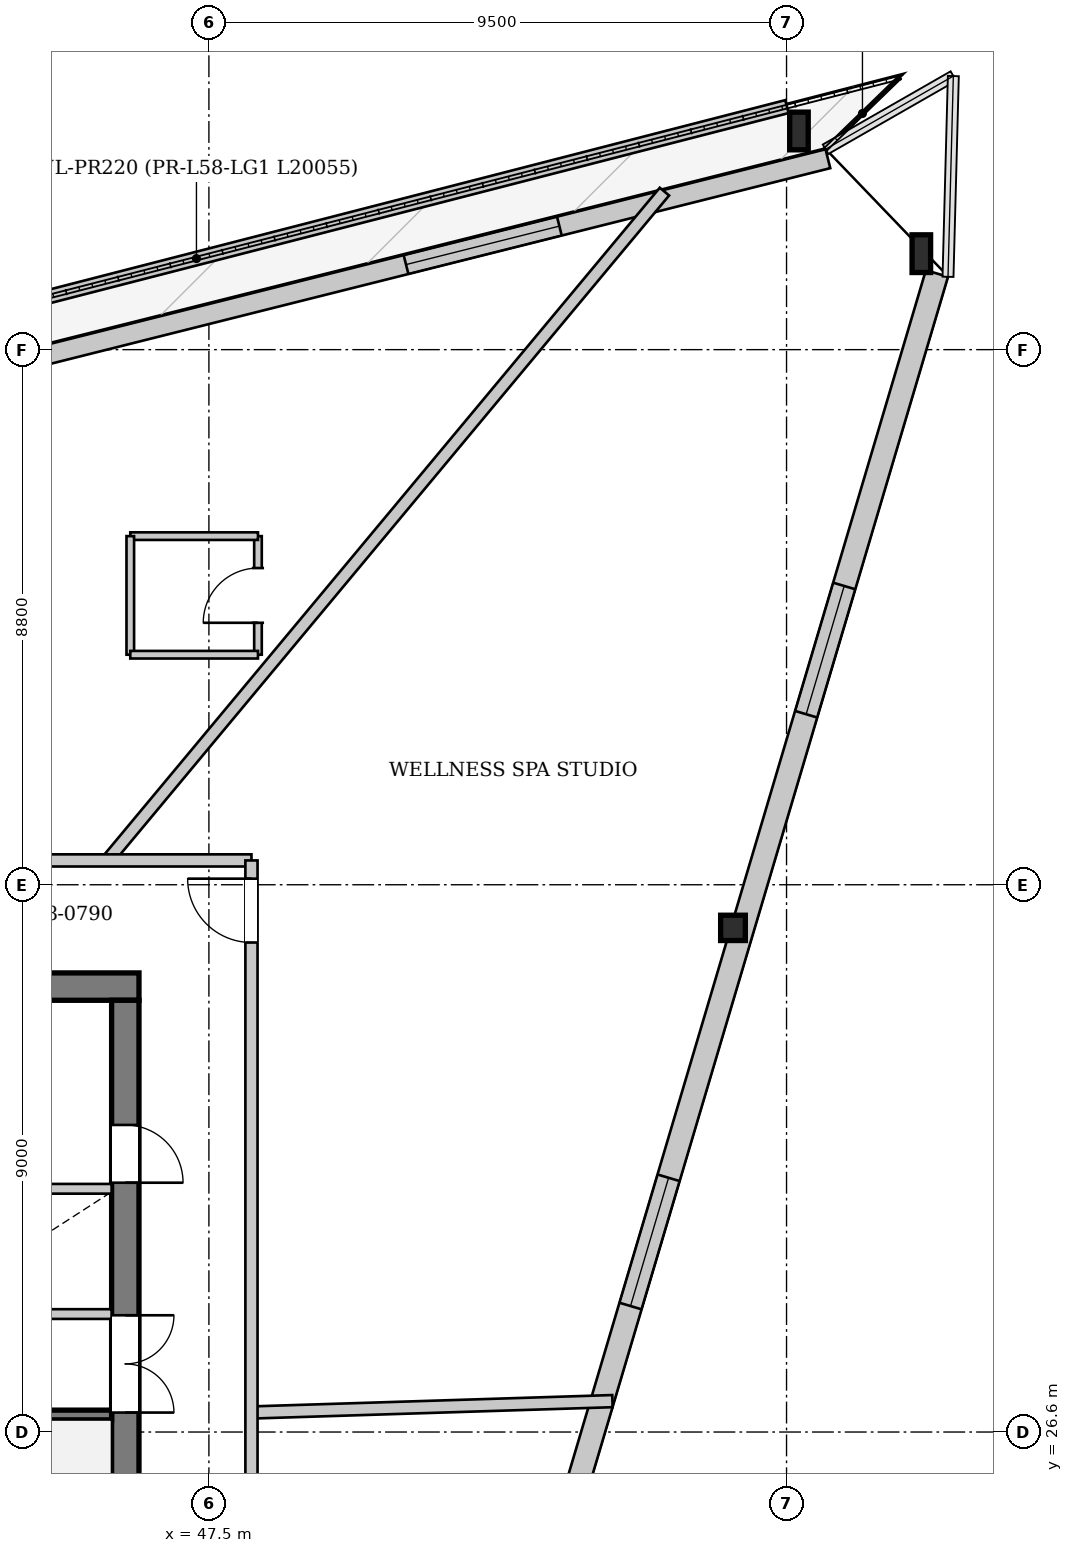
"""IFC4 building model, lengths in metres.
Left out: names, types, materials, properties, quantities, classifications, styles, units other than length and angle.
Written with IfcOpenShell. Run it as: python <this file> out.ifc"""

import sys

from ifc_helpers import new_model, si_unit, direction, frame, frame_2d, origin, origin_2d, place, context, subcontext, project, spatial, rectangle, i_section, extrude, source, transform, mapped, element, fill, save


model = new_model("IFC4")
c1 = context("Model", 3, precision=1e-05, world=origin(), true_north=direction((0.0, 1.0)))
c2 = subcontext(c1, "Body", "Model", "MODEL_VIEW")
j1 = project(units=[si_unit("LENGTHUNIT", "METRE"), si_unit("PLANEANGLEUNIT", "RADIAN")], contexts=[c1])
p1 = place(None, origin())
s1 = spatial("IfcSite", under=j1, at=p1, CompositionType="ELEMENT")
p2 = place(p1, origin())
s2 = spatial("IfcBuilding", under=s1, at=p2, CompositionType="ELEMENT")
p3 = place(p2, frame((0.0, 0.0, 220.25)))
s3 = spatial("IfcBuildingStorey", under=s2, at=p3, CompositionType="ELEMENT", Elevation=220.25)
m1 = source(origin(), c2, "Body", "SweptSolid", [
    extrude(i_section(OverallWidth=0.305, OverallDepth=0.62, WebThickness=0.021, FlangeThickness=0.04, at=origin_2d()), origin(), (0.0, 0.0, 1.0), 3.579),
])
p4 = place(p3, frame((59.656, 45.598, 0.0), z_axis=(-0.245246591305, 0.2126380042, 0.94585368246), x_axis=(-0.65509054937, -0.755550376961, 0.0)))
e1 = element("IfcColumn", 1, at=p4, inside=s3, PredefinedType="COLUMN", context=c2, shape_type="MappedRepresentation", body=[
    mapped(m1, transform((0.0, 0.0, 0.0), x_axis=(1.0, 0.0, 0.0), y_axis=(0.0, 1.0, 0.0), z_axis=(0.0, 0.0, 1.0), scale=1.0)),
])
m2 = source(origin(), c2, "Body", "SweptSolid", [
    extrude(i_section(OverallWidth=0.305, OverallDepth=0.62, WebThickness=0.021, FlangeThickness=0.04, at=origin_2d()), origin(), (0.0, 0.0, 1.0), 3.548),
])
p5 = place(p3, frame((57.641, 47.695, 0.0), z_axis=(-0.246375224897, 0.169778681514, 0.954187847261), x_axis=(-0.567426549776, -0.823424016294, 0.0)))
e2 = element("IfcColumn", 2, at=p5, inside=s3, PredefinedType="COLUMN", context=c2, shape_type="MappedRepresentation", body=[
    mapped(m2, transform((0.0, 0.0, 0.0), x_axis=(1.0, 0.0, 0.0), y_axis=(0.0, 1.0, 0.0), z_axis=(0.0, 0.0, 1.0), scale=1.0)),
])
m3 = source(origin(), c2, "Body", "SweptSolid", [
    extrude(i_section(OverallWidth=0.406, OverallDepth=0.416, WebThickness=0.027, FlangeThickness=0.042, at=origin_2d()), origin(), (0.0, 0.0, 1.0), 3.495),
])
p6 = place(p3, frame((56.373, 34.539, 0.0), z_axis=(-0.145518406884, 0.201546137235, 0.968609078949), x_axis=(-0.810760735257, -0.585377681643, 0.0)))
e3 = element("IfcColumn", 3, at=p6, inside=s3, PredefinedType="COLUMN", context=c2, shape_type="MappedRepresentation", body=[
    mapped(m3, transform((0.0, 0.0, 0.0), x_axis=(1.0, 0.0, 0.0), y_axis=(0.0, 1.0, 0.0), z_axis=(0.0, 0.0, 1.0), scale=1.0)),
])
p7 = place(p3, frame((35.846, 42.061, 0.0), z_axis=(0.0, 0.0, 1.0), x_axis=(0.969934169837, 0.243367430408, 0.0)))
e4 = element("IfcWall", 4, at=p7, inside=s3, PredefinedType="SOLIDWALL", context=c2, shape_type="SweptSolid", body=[
    extrude(rectangle(XDim=22.511, YDim=0.32, at=frame_2d((11.256, 0.0))), origin(), (0.0, 0.0, 1.0), 2.822),
])
p8 = place(p7, frame((6.454, 0.0, 0.0)))
e5 = element("IfcOpeningElement", 5, at=p8, cuts=e4, PredefinedType="OPENING", context=c2, shape_type="SweptSolid", body=[
    extrude(rectangle(XDim=1.5, YDim=2.3, at=frame_2d((0.75, 1.15))), frame((0.0, 0.17, 0.0), z_axis=(0.0, -1.0, 0.0), x_axis=(1.0, 0.0, 0.0)), (0.0, 0.0, 1.0), 0.34),
])
p9 = place(p7, frame((15.358, 0.0, 0.352)))
e6 = element("IfcOpeningElement", 6, at=p9, cuts=e4, PredefinedType="OPENING", context=c2, shape_type="SweptSolid", body=[
    extrude(rectangle(XDim=2.6, YDim=2.35, at=frame_2d((1.3, 1.175))), frame((0.0, 0.17, 0.0), z_axis=(0.0, -1.0, 0.0), x_axis=(1.0, 0.0, 0.0)), (0.0, 0.0, 1.0), 0.34),
])
p10 = place(p3, frame((59.474, 45.652, 0.0), z_axis=(0.0, 0.0, 1.0), x_axis=(-0.284530367531, -0.958667027676, 0.0)))
e7 = element("IfcWall", 7, at=p10, inside=s3, PredefinedType="SOLIDWALL", context=c2, shape_type="SweptSolid", body=[
    extrude(rectangle(XDim=23.072, YDim=0.38, at=frame_2d((11.536, 0.0))), origin(), (0.0, 0.0, 1.0), 2.822),
])
p11 = place(p10, frame((5.36, 0.0, 0.452)))
e8 = element("IfcOpeningElement", 8, at=p11, cuts=e7, PredefinedType="OPENING", context=c2, shape_type="SweptSolid", body=[
    extrude(rectangle(XDim=2.2, YDim=2.25, at=frame_2d((1.1, 1.125))), frame((0.0, 0.2, 0.0), z_axis=(0.0, -1.0, 0.0), x_axis=(1.0, 0.0, 0.0)), (0.0, 0.0, 1.0), 0.4),
])
p12 = place(p10, frame((15.512, 0.0, 0.452)))
e9 = element("IfcOpeningElement", 9, at=p12, cuts=e7, PredefinedType="OPENING", context=c2, shape_type="SweptSolid", body=[
    extrude(rectangle(XDim=2.2, YDim=2.25, at=frame_2d((1.1, 1.125))), frame((0.0, 0.2, 0.0), z_axis=(0.0, -1.0, 0.0), x_axis=(1.0, 0.0, 0.0)), (0.0, 0.0, 1.0), 0.4),
])
p13 = place(p3, frame((57.006, 48.396, 0.0), z_axis=(0.0, 0.0, 1.0), x_axis=(-0.968440730426, -0.249243960111, 0.0)))
e10 = element("IfcWall", 10, at=p13, inside=s3, PredefinedType="PARAPET", context=c2, shape_type="SweptSolid", body=[
    extrude(rectangle(XDim=20.055, YDim=0.22, at=frame_2d((10.027, 0.0))), origin(), (0.0, 0.0, 1.0), 0.3),
])
p14 = place(p3, frame((29.65, 33.925, 0.0), z_axis=(0.0, 0.0, 1.0), x_axis=(1.0, 0.0, 0.0)))
e11 = element("IfcWall", 11, at=p14, inside=s3, PredefinedType="SHEAR", context=c2, shape_type="SweptSolid", body=[
    extrude(rectangle(XDim=16.7, YDim=0.45, at=frame_2d((8.35, 0.0))), origin(), (0.0, 0.0, 1.0), 3.33),
])
p15 = place(p14, frame((1.45, 0.0, 0.0)))
e12 = element("IfcOpeningElement", 12, at=p15, cuts=e11, PredefinedType="OPENING", context=c2, shape_type="SweptSolid", body=[
    extrude(rectangle(XDim=0.95, YDim=2.1, at=frame_2d((0.475, 1.05))), frame((0.0, 0.235, 0.0), z_axis=(0.0, -1.0, 0.0), x_axis=(1.0, 0.0, 0.0)), (0.0, 0.0, 1.0), 0.47),
])
p16 = place(p14, frame((3.83, 0.0, 0.0)))
e13 = element("IfcOpeningElement", 13, at=p16, cuts=e11, PredefinedType="OPENING", context=c2, shape_type="SweptSolid", body=[
    extrude(rectangle(XDim=1.32, YDim=2.2, at=frame_2d((0.66, 1.1))), frame((0.0, 0.235, 0.0), z_axis=(0.0, -1.0, 0.0), x_axis=(1.0, 0.0, 0.0)), (0.0, 0.0, 1.0), 0.47),
])
p17 = place(p3, frame((46.125, 33.7, 0.0), z_axis=(0.0, 0.0, 1.0), x_axis=(0.0, -1.0, 0.0)))
e14 = element("IfcWall", 14, at=p17, inside=s3, PredefinedType="SHEAR", context=c2, shape_type="SweptSolid", body=[
    extrude(rectangle(XDim=14.2, YDim=0.45, at=frame_2d((7.1, 0.0))), origin(), (0.0, 0.0, 1.0), 3.33),
])
p18 = place(p17, frame((5.18, 0.0, 0.0)))
e15 = element("IfcOpeningElement", 15, at=p18, cuts=e14, PredefinedType="OPENING", context=c2, shape_type="SweptSolid", body=[
    extrude(rectangle(XDim=1.6, YDim=2.2, at=frame_2d((0.8, 1.1))), frame((0.0, 0.235, 0.0), z_axis=(0.0, -1.0, 0.0), x_axis=(1.0, 0.0, 0.0)), (0.0, 0.0, 1.0), 0.47),
])
p19 = place(p17, frame((2.05, 0.0, 0.0)))
e16 = element("IfcOpeningElement", 16, at=p19, cuts=e14, PredefinedType="OPENING", context=c2, shape_type="SweptSolid", body=[
    extrude(rectangle(XDim=0.95, YDim=2.1, at=frame_2d((0.475, 1.05))), frame((0.0, 0.235, 0.0), z_axis=(0.0, -1.0, 0.0), x_axis=(1.0, 0.0, 0.0)), (0.0, 0.0, 1.0), 0.47),
])
p20 = place(p3, frame((42.88, 26.88, 0.0), z_axis=(0.0, 0.0, 1.0), x_axis=(1.0, 0.0, 0.0)))
e17 = element("IfcWall", 17, at=p20, inside=s3, PredefinedType="PARTITIONING", context=c2, shape_type="SweptSolid", body=[
    extrude(rectangle(XDim=3.02, YDim=0.16, at=frame_2d((1.51, 0.0))), origin(), (0.0, 0.0, 1.0), 3.33),
])
p21 = place(p3, frame((33.28, 28.54, 0.0), z_axis=(0.0, 0.0, 1.0), x_axis=(1.0, 0.0, 0.0)))
e18 = element("IfcWall", 18, at=p21, inside=s3, PredefinedType="PARTITIONING", context=c2, shape_type="SweptSolid", body=[
    extrude(rectangle(XDim=12.62, YDim=0.16, at=frame_2d((6.31, 0.0))), origin(), (0.0, 0.0, 1.0), 3.33),
])
p22 = place(p21, frame((0.26, 0.0, 0.0)))
e19 = element("IfcOpeningElement", 19, at=p22, cuts=e18, PredefinedType="OPENING", context=c2, shape_type="SweptSolid", body=[
    extrude(rectangle(XDim=1.1, YDim=2.2, at=frame_2d((0.55, 1.1))), frame((0.0, 0.09, 0.0), z_axis=(0.0, -1.0, 0.0), x_axis=(1.0, 0.0, 0.0)), (0.0, 0.0, 1.0), 0.18),
])
p23 = place(p21, frame((2.01, 0.0, 0.0)))
e20 = element("IfcOpeningElement", 20, at=p23, cuts=e18, PredefinedType="OPENING", context=c2, shape_type="SweptSolid", body=[
    extrude(rectangle(XDim=1.1, YDim=2.2, at=frame_2d((0.55, 1.1))), frame((0.0, 0.09, 0.0), z_axis=(0.0, -1.0, 0.0), x_axis=(1.0, 0.0, 0.0)), (0.0, 0.0, 1.0), 0.18),
])
p24 = place(p21, frame((3.76, 0.0, 0.0)))
e21 = element("IfcOpeningElement", 21, at=p24, cuts=e18, PredefinedType="OPENING", context=c2, shape_type="SweptSolid", body=[
    extrude(rectangle(XDim=1.1, YDim=2.2, at=frame_2d((0.55, 1.1))), frame((0.0, 0.09, 0.0), z_axis=(0.0, -1.0, 0.0), x_axis=(1.0, 0.0, 0.0)), (0.0, 0.0, 1.0), 0.18),
])
p25 = place(p3, frame((40.72, 30.6, 0.0), z_axis=(0.0, 0.0, 1.0), x_axis=(1.0, 0.0, 0.0)))
e22 = element("IfcWall", 22, at=p25, inside=s3, PredefinedType="PARTITIONING", context=c2, shape_type="SweptSolid", body=[
    extrude(rectangle(XDim=5.18, YDim=0.16, at=frame_2d((2.59, 0.0))), origin(), (0.0, 0.0, 1.0), 3.33),
])
p26 = place(p3, frame((48.2, 26.921, 0.0), z_axis=(0.0, 0.0, 1.0), x_axis=(0.99950422515, 0.031484979087, 0.0)))
e23 = element("IfcWall", 23, at=p26, inside=s3, PredefinedType="PARTITIONING", context=c2, shape_type="SweptSolid", body=[
    extrude(rectangle(XDim=5.94, YDim=0.2, at=frame_2d((2.97, 0.0))), origin(), (0.0, 0.0, 1.0), 3.33),
])
p27 = place(p3, frame((45.83, 36.0, 0.0), z_axis=(0.0, 0.0, 1.0), x_axis=(0.640019986759, 0.768358260545, 0.0)))
e24 = element("IfcWall", 24, at=p27, inside=s3, PredefinedType="PARTITIONING", context=c2, shape_type="SweptSolid", body=[
    extrude(rectangle(XDim=14.315, YDim=0.2, at=frame_2d((7.157, 0.0))), origin(), (0.0, 0.0, 1.0), 2.925),
])
p28 = place(p3, frame((48.307, 39.383, 0.0), z_axis=(0.0, 0.0, 1.0), x_axis=(0.0, 1.0, 0.0)))
e25 = element("IfcWall", 25, at=p28, inside=s3, PredefinedType="PARTITIONING", context=c2, shape_type="SweptSolid", body=[
    extrude(rectangle(XDim=1.95, YDim=0.125, at=frame_2d((0.975, 0.0))), origin(), (0.0, 0.0, 1.0), 3.33),
])
p29 = place(p28, frame((0.525, 0.0, 0.0)))
e26 = element("IfcOpeningElement", 26, at=p29, cuts=e25, PredefinedType="OPENING", context=c2, shape_type="SweptSolid", body=[
    extrude(rectangle(XDim=0.9, YDim=2.1, at=frame_2d((0.45, 1.05))), frame((0.0, 0.073, 0.0), z_axis=(0.0, -1.0, 0.0), x_axis=(1.0, 0.0, 0.0)), (0.0, 0.0, 1.0), 0.145),
])
p30 = place(p3, frame((48.307, 41.333, 0.0), z_axis=(0.0, 0.0, 1.0), x_axis=(-1.0, 0.0, 0.0)))
e27 = element("IfcWall", 27, at=p30, inside=s3, PredefinedType="PARTITIONING", context=c2, shape_type="SweptSolid", body=[
    extrude(rectangle(XDim=2.1, YDim=0.125, at=frame_2d((1.05, 0.0))), origin(), (0.0, 0.0, 1.0), 3.075),
])
p31 = place(p3, frame((46.207, 41.333, 0.0), z_axis=(0.0, 0.0, 1.0), x_axis=(0.0, -1.0, 0.0)))
e28 = element("IfcWall", 28, at=p31, inside=s3, PredefinedType="PARTITIONING", context=c2, shape_type="SweptSolid", body=[
    extrude(rectangle(XDim=1.95, YDim=0.125, at=frame_2d((0.975, 0.0))), origin(), (0.0, 0.0, 1.0), 3.33),
])
p32 = place(p3, frame((46.207, 39.383, 0.0), z_axis=(0.0, 0.0, 1.0), x_axis=(1.0, 0.0, 0.0)))
e29 = element("IfcWall", 29, at=p32, inside=s3, PredefinedType="PARTITIONING", context=c2, shape_type="SweptSolid", body=[
    extrude(rectangle(XDim=2.1, YDim=0.125, at=frame_2d((1.05, 0.0))), origin(), (0.0, 0.0, 1.0), 3.33),
])
p33 = place(p3, frame((43.4, 36.0, 0.0), z_axis=(0.0, 0.0, 1.0), x_axis=(1.0, 0.0, 0.0)))
e30 = element("IfcWall", 30, at=p33, inside=s3, PredefinedType="PARTITIONING", context=c2, shape_type="SweptSolid", body=[
    extrude(rectangle(XDim=4.8, YDim=0.2, at=frame_2d((2.4, 0.0))), origin(), (0.0, 0.0, 1.0), 3.33),
])
p34 = place(p33, frame((0.3, 0.0, 0.0)))
e31 = element("IfcOpeningElement", 31, at=p34, cuts=e30, PredefinedType="OPENING", context=c2, shape_type="SweptSolid", body=[
    extrude(rectangle(XDim=1.05, YDim=2.2, at=frame_2d((0.525, 1.1))), frame((0.0, 0.11, 0.0), z_axis=(0.0, -1.0, 0.0), x_axis=(1.0, 0.0, 0.0)), (0.0, 0.0, 1.0), 0.22),
])
p35 = place(p3, frame((48.2, 17.2, 0.0), z_axis=(0.0, 0.0, 1.0), x_axis=(0.0, 1.0, 0.0)))
e32 = element("IfcWall", 32, at=p35, inside=s3, PredefinedType="PARTITIONING", context=c2, shape_type="SweptSolid", body=[
    extrude(rectangle(XDim=18.8, YDim=0.2, at=frame_2d((9.4, 0.0))), origin(), (0.0, 0.0, 1.0), 3.015),
])
p36 = place(p35, frame((2.68, 0.0, 0.0)))
e33 = element("IfcOpeningElement", 33, at=p36, cuts=e32, PredefinedType="OPENING", context=c2, shape_type="SweptSolid", body=[
    extrude(rectangle(XDim=1.05, YDim=2.2, at=frame_2d((0.525, 1.1))), frame((0.0, 0.11, 0.0), z_axis=(0.0, -1.0, 0.0), x_axis=(1.0, 0.0, 0.0)), (0.0, 0.0, 1.0), 0.22),
])
p37 = place(p35, frame((17.45, 0.0, 0.0)))
e34 = element("IfcOpeningElement", 34, at=p37, cuts=e32, PredefinedType="OPENING", context=c2, shape_type="SweptSolid", body=[
    extrude(rectangle(XDim=1.05, YDim=2.2, at=frame_2d((0.525, 1.1))), frame((0.0, 0.11, 0.0), z_axis=(0.0, -1.0, 0.0), x_axis=(1.0, 0.0, 0.0)), (0.0, 0.0, 1.0), 0.22),
])
m4 = source(origin(), c2, "Body", "SweptSolid", [
    extrude(rectangle(XDim=2.6, YDim=2.35, at=frame_2d((1.3, 1.175))), frame((0.0, 0.03, 0.0), z_axis=(0.0, -1.0, 0.0), x_axis=(1.0, 0.0, 0.0)), (0.0, 0.0, 1.0), 0.06),
])
p38 = place(p9, origin())
e35 = element("IfcWindow", 35, at=p38, inside=s3, PartitioningType="SINGLE_PANEL", PredefinedType="WINDOW", context=c2, shape_type="MappedRepresentation", body=[
    mapped(m4, transform((0.0, 0.0, 0.0), x_axis=(1.0, 0.0, 0.0), y_axis=(0.0, 1.0, 0.0), z_axis=(0.0, 0.0, 1.0), scale=1.0)),
])
fill(e6, e35)
m5 = source(origin(), c2, "Body", "SweptSolid", [
    extrude(rectangle(XDim=2.2, YDim=2.25, at=frame_2d((1.1, 1.125))), frame((0.0, 0.03, 0.0), z_axis=(0.0, -1.0, 0.0), x_axis=(1.0, 0.0, 0.0)), (0.0, 0.0, 1.0), 0.06),
])
p39 = place(p11, origin())
e36 = element("IfcWindow", 36, at=p39, inside=s3, PartitioningType="SINGLE_PANEL", PredefinedType="WINDOW", context=c2, shape_type="MappedRepresentation", body=[
    mapped(m5, transform((0.0, 0.0, 0.0), x_axis=(1.0, 0.0, 0.0), y_axis=(0.0, 1.0, 0.0), z_axis=(0.0, 0.0, 1.0), scale=1.0)),
])
fill(e8, e36)
p40 = place(p12, origin())
e37 = element("IfcWindow", 37, at=p40, inside=s3, PartitioningType="SINGLE_PANEL", PredefinedType="WINDOW", context=c2, shape_type="MappedRepresentation", body=[
    mapped(m5, transform((0.0, 0.0, 0.0), x_axis=(1.0, 0.0, 0.0), y_axis=(0.0, 1.0, 0.0), z_axis=(0.0, 0.0, 1.0), scale=1.0)),
])
fill(e9, e37)
m6 = source(origin(), c2, "Body", "SweptSolid", [
    extrude(rectangle(XDim=1.6, YDim=2.2, at=frame_2d((0.8, 1.1))), frame((0.0, 0.025, 0.0), z_axis=(0.0, -1.0, 0.0), x_axis=(1.0, 0.0, 0.0)), (0.0, 0.0, 1.0), 0.05),
])
p41 = place(p18, origin())
e38 = element("IfcDoor", 38, at=p41, inside=s3, OperationType="DOUBLE_DOOR_SINGLE_SWING", PredefinedType="DOOR", context=c2, shape_type="MappedRepresentation", body=[
    mapped(m6, transform((0.0, 0.0, 0.0), x_axis=(1.0, 0.0, 0.0), y_axis=(0.0, 1.0, 0.0), z_axis=(0.0, 0.0, 1.0), scale=1.0)),
])
fill(e15, e38)
m7 = source(origin(), c2, "Body", "SweptSolid", [
    extrude(rectangle(XDim=0.95, YDim=2.1, at=frame_2d((0.475, 1.05))), frame((0.0, 0.025, 0.0), z_axis=(0.0, -1.0, 0.0), x_axis=(1.0, 0.0, 0.0)), (0.0, 0.0, 1.0), 0.05),
])
p42 = place(p19, origin())
e39 = element("IfcDoor", 39, at=p42, inside=s3, OperationType="SINGLE_SWING_RIGHT", PredefinedType="DOOR", context=c2, shape_type="MappedRepresentation", body=[
    mapped(m7, transform((0.0, 0.0, 0.0), x_axis=(1.0, 0.0, 0.0), y_axis=(0.0, 1.0, 0.0), z_axis=(0.0, 0.0, 1.0), scale=1.0)),
])
fill(e16, e39)
m8 = source(origin(), c2, "Body", "SweptSolid", [
    extrude(rectangle(XDim=0.9, YDim=2.1, at=frame_2d((0.45, 1.05))), frame((0.0, 0.025, 0.0), z_axis=(0.0, -1.0, 0.0), x_axis=(1.0, 0.0, 0.0)), (0.0, 0.0, 1.0), 0.05),
])
p43 = place(p29, origin())
e40 = element("IfcDoor", 40, at=p43, inside=s3, OperationType="SINGLE_SWING_LEFT", PredefinedType="DOOR", context=c2, shape_type="MappedRepresentation", body=[
    mapped(m8, transform((0.0, 0.0, 0.0), x_axis=(1.0, 0.0, 0.0), y_axis=(0.0, 1.0, 0.0), z_axis=(0.0, 0.0, 1.0), scale=1.0)),
])
fill(e26, e40)
m9 = source(origin(), c2, "Body", "SweptSolid", [
    extrude(rectangle(XDim=1.05, YDim=2.2, at=frame_2d((0.525, 1.1))), frame((0.0, 0.025, 0.0), z_axis=(0.0, -1.0, 0.0), x_axis=(1.0, 0.0, 0.0)), (0.0, 0.0, 1.0), 0.05),
])
p44 = place(p37, origin())
e41 = element("IfcDoor", 41, at=p44, inside=s3, OperationType="SINGLE_SWING_RIGHT", PredefinedType="DOOR", context=c2, shape_type="MappedRepresentation", body=[
    mapped(m9, transform((0.0, 0.0, 0.0), x_axis=(1.0, 0.0, 0.0), y_axis=(0.0, 1.0, 0.0), z_axis=(0.0, 0.0, 1.0), scale=1.0)),
])
fill(e34, e41)
save(model, sys.argv[1])
